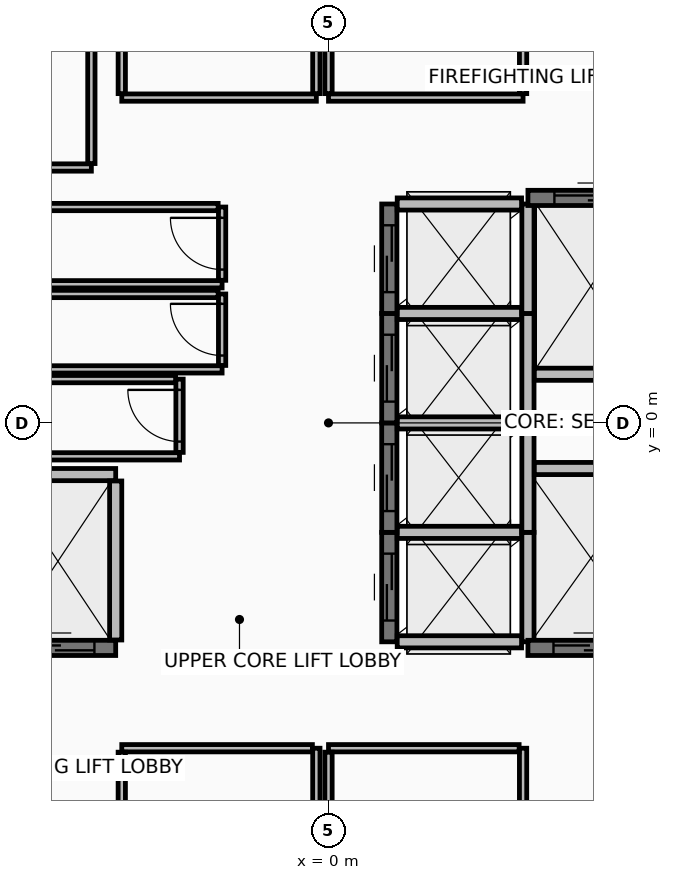
"""IFC4 building model, lengths in metres.
Left out: names, types, materials, properties, quantities, classifications, styles, units other than length and angle.
Written with IfcOpenShell. Run it as: python <this file> out.ifc"""

import sys

from ifc_helpers import new_model, si_unit, direction, frame, frame_2d, origin, place, context, subcontext, project, spatial, rectangle, extrude, element, fill, save


model = new_model("IFC4")
c1 = context("Model", 3, precision=1e-05, world=origin(), true_north=direction((0.0, 1.0)))
c2 = subcontext(c1, "Body", "Model", "MODEL_VIEW")
j1 = project(units=[si_unit("LENGTHUNIT", "METRE"), si_unit("PLANEANGLEUNIT", "RADIAN")], contexts=[c1])
p1 = place(None, origin())
s1 = spatial("IfcSite", under=j1, at=p1, CompositionType="ELEMENT")
p2 = place(p1, origin())
s2 = spatial("IfcBuilding", under=s1, at=p2, CompositionType="ELEMENT")
p3 = place(p2, frame((0.0, 0.0, 241.45)))
s3 = spatial("IfcBuildingStorey", under=s2, at=p3, CompositionType="ELEMENT", Elevation=241.45)
p4 = place(p3, frame((1.0, -3.6, 0.0), z_axis=(0.0, 0.0, 1.0), x_axis=(0.0, 1.0, 0.0)))
e1 = element("IfcWall", 1, at=p4, inside=s3, PredefinedType="SHEAR", context=c2, shape_type="SweptSolid", body=[
    extrude(rectangle(XDim=1.8, YDim=0.25, at=frame_2d((0.9, 0.0))), origin(), (0.0, 0.0, 1.0), 3.42),
])
p5 = place(p4, frame((0.35, 0.0, 0.0)))
e2 = element("IfcOpeningElement", 2, at=p5, cuts=e1, PredefinedType="OPENING", context=c2, shape_type="SweptSolid", body=[
    extrude(rectangle(XDim=1.1, YDim=2.2, at=frame_2d((0.55, 1.1))), frame((0.0, 0.135, 0.0), z_axis=(0.0, -1.0, 0.0), x_axis=(1.0, 0.0, 0.0)), (0.0, 0.0, 1.0), 0.27),
])
p6 = place(p3, frame((3.28, -3.6, 0.0), z_axis=(0.0, 0.0, 1.0), x_axis=(0.0, 1.0, 0.0)))
e3 = element("IfcWall", 3, at=p6, inside=s3, PredefinedType="PARTITIONING", context=c2, shape_type="SweptSolid", body=[
    extrude(rectangle(XDim=1.8, YDim=0.2, at=frame_2d((0.9, 0.0))), origin(), (0.0, 0.0, 1.0), 3.42),
])
for number, where, z_axis, x_axis in (
    (4, (1.13, -3.6, 0.0), (0.0, 0.0, 1.0), (1.0, 0.0, 0.0)),
    (5, (1.13, -1.8, 0.0), (0.0, 0.0, 1.0), (1.0, 0.0, 0.0)),
):
    element("IfcWall", number, at=place(p3, frame(where, z_axis=z_axis, x_axis=x_axis)), inside=s3, PredefinedType="PARTITIONING", context=c2, shape_type="SweptSolid", body=[
        extrude(rectangle(XDim=2.045, YDim=0.2, at=frame_2d((1.022, 0.0))), origin(), (0.0, 0.0, 1.0), 3.42),
    ])
p7 = place(p3, frame((1.0, -1.8, 0.0), z_axis=(0.0, 0.0, 1.0), x_axis=(0.0, 1.0, 0.0)))
e6 = element("IfcWall", 6, at=p7, inside=s3, PredefinedType="SHEAR", context=c2, shape_type="SweptSolid", body=[
    extrude(rectangle(XDim=1.8, YDim=0.25, at=frame_2d((0.9, 0.0))), origin(), (0.0, 0.0, 1.0), 3.42),
])
p8 = place(p7, frame((0.35, 0.0, 0.0)))
e7 = element("IfcOpeningElement", 7, at=p8, cuts=e6, PredefinedType="OPENING", context=c2, shape_type="SweptSolid", body=[
    extrude(rectangle(XDim=1.1, YDim=2.2, at=frame_2d((0.55, 1.1))), frame((0.0, 0.135, 0.0), z_axis=(0.0, -1.0, 0.0), x_axis=(1.0, 0.0, 0.0)), (0.0, 0.0, 1.0), 0.27),
])
p9 = place(p3, frame((3.28, -1.8, 0.0), z_axis=(0.0, 0.0, 1.0), x_axis=(0.0, 1.0, 0.0)))
e8 = element("IfcWall", 8, at=p9, inside=s3, PredefinedType="PARTITIONING", context=c2, shape_type="SweptSolid", body=[
    extrude(rectangle(XDim=1.8, YDim=0.2, at=frame_2d((0.9, 0.0))), origin(), (0.0, 0.0, 1.0), 3.42),
])
p10 = place(p3, frame((1.13, 0.0, 0.0), z_axis=(0.0, 0.0, 1.0), x_axis=(1.0, 0.0, 0.0)))
e9 = element("IfcWall", 9, at=p10, inside=s3, PredefinedType="PARTITIONING", context=c2, shape_type="SweptSolid", body=[
    extrude(rectangle(XDim=2.045, YDim=0.2, at=frame_2d((1.022, 0.0))), origin(), (0.0, 0.0, 1.0), 3.42),
])
p11 = place(p3, frame((1.0, 0.0, 0.0), z_axis=(0.0, 0.0, 1.0), x_axis=(0.0, 1.0, 0.0)))
e10 = element("IfcWall", 10, at=p11, inside=s3, PredefinedType="SHEAR", context=c2, shape_type="SweptSolid", body=[
    extrude(rectangle(XDim=1.8, YDim=0.25, at=frame_2d((0.9, 0.0))), origin(), (0.0, 0.0, 1.0), 3.42),
])
p12 = place(p11, frame((0.35, 0.0, 0.0)))
e11 = element("IfcOpeningElement", 11, at=p12, cuts=e10, PredefinedType="OPENING", context=c2, shape_type="SweptSolid", body=[
    extrude(rectangle(XDim=1.1, YDim=2.2, at=frame_2d((0.55, 1.1))), frame((0.0, 0.135, 0.0), z_axis=(0.0, -1.0, 0.0), x_axis=(1.0, 0.0, 0.0)), (0.0, 0.0, 1.0), 0.27),
])
p13 = place(p3, frame((3.28, 0.0, 0.0), z_axis=(0.0, 0.0, 1.0), x_axis=(0.0, 1.0, 0.0)))
e12 = element("IfcWall", 12, at=p13, inside=s3, PredefinedType="PARTITIONING", context=c2, shape_type="SweptSolid", body=[
    extrude(rectangle(XDim=1.8, YDim=0.2, at=frame_2d((0.9, 0.0))), origin(), (0.0, 0.0, 1.0), 3.42),
])
p14 = place(p3, frame((1.13, 1.8, 0.0), z_axis=(0.0, 0.0, 1.0), x_axis=(1.0, 0.0, 0.0)))
e13 = element("IfcWall", 13, at=p14, inside=s3, PredefinedType="PARTITIONING", context=c2, shape_type="SweptSolid", body=[
    extrude(rectangle(XDim=2.045, YDim=0.2, at=frame_2d((1.022, 0.0))), origin(), (0.0, 0.0, 1.0), 3.42),
])
p15 = place(p3, frame((1.0, 1.8, 0.0), z_axis=(0.0, 0.0, 1.0), x_axis=(0.0, 1.0, 0.0)))
e14 = element("IfcWall", 14, at=p15, inside=s3, PredefinedType="SHEAR", context=c2, shape_type="SweptSolid", body=[
    extrude(rectangle(XDim=1.8, YDim=0.25, at=frame_2d((0.9, 0.0))), origin(), (0.0, 0.0, 1.0), 3.42),
])
p16 = place(p15, frame((0.35, 0.0, 0.0)))
e15 = element("IfcOpeningElement", 15, at=p16, cuts=e14, PredefinedType="OPENING", context=c2, shape_type="SweptSolid", body=[
    extrude(rectangle(XDim=1.1, YDim=2.2, at=frame_2d((0.55, 1.1))), frame((0.0, 0.135, 0.0), z_axis=(0.0, -1.0, 0.0), x_axis=(1.0, 0.0, 0.0)), (0.0, 0.0, 1.0), 0.27),
])
p17 = place(p3, frame((3.28, 1.8, 0.0), z_axis=(0.0, 0.0, 1.0), x_axis=(0.0, 1.0, 0.0)))
e16 = element("IfcWall", 16, at=p17, inside=s3, PredefinedType="PARTITIONING", context=c2, shape_type="SweptSolid", body=[
    extrude(rectangle(XDim=1.8, YDim=0.2, at=frame_2d((0.9, 0.0))), origin(), (0.0, 0.0, 1.0), 3.42),
])
p18 = place(p3, frame((1.13, 3.6, 0.0), z_axis=(0.0, 0.0, 1.0), x_axis=(1.0, 0.0, 0.0)))
e17 = element("IfcWall", 17, at=p18, inside=s3, PredefinedType="PARTITIONING", context=c2, shape_type="SweptSolid", body=[
    extrude(rectangle(XDim=2.045, YDim=0.2, at=frame_2d((1.022, 0.0))), origin(), (0.0, 0.0, 1.0), 2.715),
])
p19 = place(p3, frame((-5.4, -3.7, 0.0), z_axis=(0.0, 0.0, 1.0), x_axis=(1.0, 0.0, 0.0)))
e18 = element("IfcWall", 18, at=p19, inside=s3, PredefinedType="SHEAR", context=c2, shape_type="SweptSolid", body=[
    extrude(rectangle(XDim=1.9, YDim=0.25, at=frame_2d((0.95, 0.0))), origin(), (0.0, 0.0, 1.0), 3.42),
])
p20 = place(p19, frame((0.35, 0.0, 0.0)))
e19 = element("IfcOpeningElement", 19, at=p20, cuts=e18, PredefinedType="OPENING", context=c2, shape_type="SweptSolid", body=[
    extrude(rectangle(XDim=1.2, YDim=2.2, at=frame_2d((0.6, 1.1))), frame((0.0, 0.135, 0.0), z_axis=(0.0, -1.0, 0.0), x_axis=(1.0, 0.0, 0.0)), (0.0, 0.0, 1.0), 0.27),
])
p21 = place(p3, frame((-5.27, -0.85, 0.0), z_axis=(0.0, 0.0, 1.0), x_axis=(1.0, 0.0, 0.0)))
e20 = element("IfcWall", 20, at=p21, inside=s3, PredefinedType="PARTITIONING", context=c2, shape_type="SweptSolid", body=[
    extrude(rectangle(XDim=1.77, YDim=0.2, at=frame_2d((0.885, 0.0))), origin(), (0.0, 0.0, 1.0), 3.42),
])
p22 = place(p3, frame((-3.5, -3.57, 0.0), z_axis=(0.0, 0.0, 1.0), x_axis=(0.0, 1.0, 0.0)))
e21 = element("IfcWall", 21, at=p22, inside=s3, PredefinedType="PARTITIONING", context=c2, shape_type="SweptSolid", body=[
    extrude(rectangle(XDim=2.615, YDim=0.2, at=frame_2d((1.308, 0.0))), origin(), (0.0, 0.0, 1.0), 3.42),
])
p23 = place(p3, frame((3.28, 3.7, 0.0), z_axis=(0.0, 0.0, 1.0), x_axis=(1.0, 0.0, 0.0)))
e22 = element("IfcWall", 22, at=p23, inside=s3, PredefinedType="SHEAR", context=c2, shape_type="SweptSolid", body=[
    extrude(rectangle(XDim=2.07, YDim=0.25, at=frame_2d((1.035, 0.0))), origin(), (0.0, 0.0, 1.0), 3.42),
])
p24 = place(p23, frame((0.435, 0.0, 0.0)))
e23 = element("IfcOpeningElement", 23, at=p24, cuts=e22, PredefinedType="OPENING", context=c2, shape_type="SweptSolid", body=[
    extrude(rectangle(XDim=1.2, YDim=2.2, at=frame_2d((0.6, 1.1))), frame((0.0, 0.135, 0.0), z_axis=(0.0, -1.0, 0.0), x_axis=(1.0, 0.0, 0.0)), (0.0, 0.0, 1.0), 0.27),
])
p25 = place(p3, frame((3.385, 0.8, 0.0), z_axis=(0.0, 0.0, 1.0), x_axis=(1.0, 0.0, 0.0)))
e24 = element("IfcWall", 24, at=p25, inside=s3, PredefinedType="PARTITIONING", context=c2, shape_type="SweptSolid", body=[
    extrude(rectangle(XDim=1.835, YDim=0.2, at=frame_2d((0.917, 0.0))), origin(), (0.0, 0.0, 1.0), 3.42),
])
p26 = place(p3, frame((3.28, -3.7, 0.0), z_axis=(0.0, 0.0, 1.0), x_axis=(1.0, 0.0, 0.0)))
e25 = element("IfcWall", 25, at=p26, inside=s3, PredefinedType="SHEAR", context=c2, shape_type="SweptSolid", body=[
    extrude(rectangle(XDim=1.94, YDim=0.25, at=frame_2d((0.97, 0.0))), origin(), (0.0, 0.0, 1.0), 3.42),
])
p27 = place(p26, frame((0.42, 0.0, 0.0)))
e26 = element("IfcOpeningElement", 26, at=p27, cuts=e25, PredefinedType="OPENING", context=c2, shape_type="SweptSolid", body=[
    extrude(rectangle(XDim=1.1, YDim=2.2, at=frame_2d((0.55, 1.1))), frame((0.0, 0.135, 0.0), z_axis=(0.0, -1.0, 0.0), x_axis=(1.0, 0.0, 0.0)), (0.0, 0.0, 1.0), 0.27),
])
p28 = place(p3, frame((3.385, -0.75, 0.0), z_axis=(0.0, 0.0, 1.0), x_axis=(1.0, 0.0, 0.0)))
e27 = element("IfcWall", 27, at=p28, inside=s3, PredefinedType="PARTITIONING", context=c2, shape_type="SweptSolid", body=[
    extrude(rectangle(XDim=1.835, YDim=0.2, at=frame_2d((0.917, 0.0))), origin(), (0.0, 0.0, 1.0), 3.42),
])
p29 = place(p3, frame((-5.22, 2.28, 0.0), z_axis=(0.0, 0.0, 1.0), x_axis=(1.0, 0.0, 0.0)))
e28 = element("IfcWall", 28, at=p29, inside=s3, PredefinedType="PARTITIONING", context=c2, shape_type="SweptSolid", body=[
    extrude(rectangle(XDim=3.47, YDim=0.12, at=frame_2d((1.735, 0.0))), origin(), (0.0, 0.0, 1.0), 3.42),
])
p30 = place(p3, frame((-1.75, 2.345, 0.0), z_axis=(0.0, 0.0, 1.0), x_axis=(0.0, 1.0, 0.0)))
e29 = element("IfcWall", 29, at=p30, inside=s3, PredefinedType="PARTITIONING", context=c2, shape_type="SweptSolid", body=[
    extrude(rectangle(XDim=1.205, YDim=0.12, at=frame_2d((0.603, 0.0))), origin(), (0.0, 0.0, 1.0), 3.42),
])
p31 = place(p30, frame((0.177, 0.0, 0.0)))
e30 = element("IfcOpeningElement", 30, at=p31, cuts=e29, PredefinedType="OPENING", context=c2, shape_type="SweptSolid", body=[
    extrude(rectangle(XDim=0.85, YDim=2.1, at=frame_2d((0.425, 1.05))), frame((0.0, 0.07, 0.0), z_axis=(0.0, -1.0, 0.0), x_axis=(1.0, 0.0, 0.0)), (0.0, 0.0, 1.0), 0.14),
])
p32 = place(p3, frame((-1.815, 3.55, 0.0), z_axis=(0.0, 0.0, 1.0), x_axis=(-1.0, 0.0, 0.0)))
e31 = element("IfcWall", 31, at=p32, inside=s3, PredefinedType="PARTITIONING", context=c2, shape_type="SweptSolid", body=[
    extrude(rectangle(XDim=3.405, YDim=0.12, at=frame_2d((1.703, 0.0))), origin(), (0.0, 0.0, 1.0), 3.42),
])
p33 = place(p3, frame((-5.22, 0.88, 0.0), z_axis=(0.0, 0.0, 1.0), x_axis=(1.0, 0.0, 0.0)))
e32 = element("IfcWall", 32, at=p33, inside=s3, PredefinedType="PARTITIONING", context=c2, shape_type="SweptSolid", body=[
    extrude(rectangle(XDim=3.47, YDim=0.12, at=frame_2d((1.735, 0.0))), origin(), (0.0, 0.0, 1.0), 3.42),
])
p34 = place(p3, frame((-1.75, 0.945, 0.0), z_axis=(0.0, 0.0, 1.0), x_axis=(0.0, 1.0, 0.0)))
e33 = element("IfcWall", 33, at=p34, inside=s3, PredefinedType="PARTITIONING", context=c2, shape_type="SweptSolid", body=[
    extrude(rectangle(XDim=1.175, YDim=0.12, at=frame_2d((0.587, 0.0))), origin(), (0.0, 0.0, 1.0), 3.42),
])
p35 = place(p34, frame((0.163, 0.0, 0.0)))
e34 = element("IfcOpeningElement", 34, at=p35, cuts=e33, PredefinedType="OPENING", context=c2, shape_type="SweptSolid", body=[
    extrude(rectangle(XDim=0.85, YDim=2.1, at=frame_2d((0.425, 1.05))), frame((0.0, 0.07, 0.0), z_axis=(0.0, -1.0, 0.0), x_axis=(1.0, 0.0, 0.0)), (0.0, 0.0, 1.0), 0.14),
])
p36 = place(p3, frame((-1.815, 2.12, 0.0), z_axis=(0.0, 0.0, 1.0), x_axis=(-1.0, 0.0, 0.0)))
e35 = element("IfcWall", 35, at=p36, inside=s3, PredefinedType="PARTITIONING", context=c2, shape_type="SweptSolid", body=[
    extrude(rectangle(XDim=3.405, YDim=0.12, at=frame_2d((1.703, 0.0))), origin(), (0.0, 0.0, 1.0), 3.42),
])
p37 = place(p3, frame((-5.22, -0.55, 0.0), z_axis=(0.0, 0.0, 1.0), x_axis=(1.0, 0.0, 0.0)))
e36 = element("IfcWall", 36, at=p37, inside=s3, PredefinedType="PARTITIONING", context=c2, shape_type="SweptSolid", body=[
    extrude(rectangle(XDim=2.77, YDim=0.12, at=frame_2d((1.385, 0.0))), origin(), (0.0, 0.0, 1.0), 3.42),
])
p38 = place(p3, frame((-2.45, -0.485, 0.0), z_axis=(0.0, 0.0, 1.0), x_axis=(0.0, 1.0, 0.0)))
e37 = element("IfcWall", 37, at=p38, inside=s3, PredefinedType="PARTITIONING", context=c2, shape_type="SweptSolid", body=[
    extrude(rectangle(XDim=1.205, YDim=0.12, at=frame_2d((0.603, 0.0))), origin(), (0.0, 0.0, 1.0), 3.42),
])
p39 = place(p38, frame((0.178, 0.0, 0.0)))
e38 = element("IfcOpeningElement", 38, at=p39, cuts=e37, PredefinedType="OPENING", context=c2, shape_type="SweptSolid", body=[
    extrude(rectangle(XDim=0.85, YDim=2.1, at=frame_2d((0.425, 1.05))), frame((0.0, 0.07, 0.0), z_axis=(0.0, -1.0, 0.0), x_axis=(1.0, 0.0, 0.0)), (0.0, 0.0, 1.0), 0.14),
])
p40 = place(p3, frame((-2.515, 0.72, 0.0), z_axis=(0.0, 0.0, 1.0), x_axis=(-1.0, 0.0, 0.0)))
e39 = element("IfcWall", 39, at=p40, inside=s3, PredefinedType="PARTITIONING", context=c2, shape_type="SweptSolid", body=[
    extrude(rectangle(XDim=2.705, YDim=0.12, at=frame_2d((1.353, 0.0))), origin(), (0.0, 0.0, 1.0), 3.42),
])
p41 = place(p3, frame((-0.2, -7.42, 0.0), z_axis=(0.0, 0.0, 1.0), x_axis=(0.0, 1.0, 0.0)))
e40 = element("IfcWall", 40, at=p41, inside=s3, PredefinedType="PARTITIONING", context=c2, shape_type="SweptSolid", body=[
    extrude(rectangle(XDim=2.07, YDim=0.12, at=frame_2d((1.035, 0.0))), origin(), (0.0, 0.0, 1.0), 2.715),
])
p42 = place(p3, frame((-0.265, -5.35, 0.0), z_axis=(0.0, 0.0, 1.0), x_axis=(-1.0, 0.0, 0.0)))
e41 = element("IfcWall", 41, at=p42, inside=s3, PredefinedType="PARTITIONING", context=c2, shape_type="SweptSolid", body=[
    extrude(rectangle(XDim=3.135, YDim=0.12, at=frame_2d((1.567, 0.0))), origin(), (0.0, 0.0, 1.0), 2.715),
])
p43 = place(p3, frame((-3.4, -5.415, 0.0), z_axis=(0.0, 0.0, 1.0), x_axis=(0.0, -1.0, 0.0)))
e42 = element("IfcWall", 42, at=p43, inside=s3, PredefinedType="PARTITIONING", context=c2, shape_type="SweptSolid", body=[
    extrude(rectangle(XDim=2.8, YDim=0.12, at=frame_2d((1.4, 0.0))), origin(), (0.0, 0.0, 1.0), 2.715),
])
p44 = place(p3, frame((3.2, -8.215, 0.0), z_axis=(0.0, 0.0, 1.0), x_axis=(0.0, 1.0, 0.0)))
e43 = element("IfcWall", 43, at=p44, inside=s3, PredefinedType="PARTITIONING", context=c2, shape_type="SweptSolid", body=[
    extrude(rectangle(XDim=2.865, YDim=0.12, at=frame_2d((1.433, 0.0))), origin(), (0.0, 0.0, 1.0), 2.715),
])
p45 = place(p3, frame((3.135, -5.35, 0.0), z_axis=(0.0, 0.0, 1.0), x_axis=(-1.0, 0.0, 0.0)))
e44 = element("IfcWall", 44, at=p45, inside=s3, PredefinedType="PARTITIONING", context=c2, shape_type="SweptSolid", body=[
    extrude(rectangle(XDim=3.135, YDim=0.12, at=frame_2d((1.567, 0.0))), origin(), (0.0, 0.0, 1.0), 3.42),
])
p46 = place(p3, frame((0.0, -5.415, 0.0), z_axis=(0.0, 0.0, 1.0), x_axis=(0.0, -1.0, 0.0)))
e45 = element("IfcWall", 45, at=p46, inside=s3, PredefinedType="PARTITIONING", context=c2, shape_type="SweptSolid", body=[
    extrude(rectangle(XDim=2.005, YDim=0.12, at=frame_2d((1.002, 0.0))), origin(), (0.0, 0.0, 1.0), 2.715),
])
p47 = place(p3, frame((-3.4, 5.35, 0.0), z_axis=(0.0, 0.0, 1.0), x_axis=(1.0, 0.0, 0.0)))
e46 = element("IfcWall", 46, at=p47, inside=s3, PredefinedType="PARTITIONING", context=c2, shape_type="SweptSolid", body=[
    extrude(rectangle(XDim=3.2, YDim=0.12, at=frame_2d((1.6, 0.0))), origin(), (0.0, 0.0, 1.0), 3.42),
])
p48 = place(p3, frame((-0.2, 5.415, 0.0), z_axis=(0.0, 0.0, 1.0), x_axis=(0.0, 1.0, 0.0)))
e47 = element("IfcWall", 47, at=p48, inside=s3, PredefinedType="PARTITIONING", context=c2, shape_type="SweptSolid", body=[
    extrude(rectangle(XDim=2.005, YDim=0.12, at=frame_2d((1.002, 0.0))), origin(), (0.0, 0.0, 1.0), 2.715),
])
p49 = place(p3, frame((-3.4, 8.215, 0.0), z_axis=(0.0, 0.0, 1.0), x_axis=(0.0, -1.0, 0.0)))
e48 = element("IfcWall", 48, at=p49, inside=s3, PredefinedType="PARTITIONING", context=c2, shape_type="SweptSolid", body=[
    extrude(rectangle(XDim=2.8, YDim=0.12, at=frame_2d((1.4, 0.0))), origin(), (0.0, 0.0, 1.0), 2.715),
])
p50 = place(p3, frame((0.0, 5.35, 0.0), z_axis=(0.0, 0.0, 1.0), x_axis=(1.0, 0.0, 0.0)))
e49 = element("IfcWall", 49, at=p50, inside=s3, PredefinedType="PARTITIONING", context=c2, shape_type="SweptSolid", body=[
    extrude(rectangle(XDim=3.2, YDim=0.12, at=frame_2d((1.6, 0.0))), origin(), (0.0, 0.0, 1.0), 2.715),
])
p51 = place(p3, frame((3.2, 5.415, 0.0), z_axis=(0.0, 0.0, 1.0), x_axis=(0.0, 1.0, 0.0)))
e50 = element("IfcWall", 50, at=p51, inside=s3, PredefinedType="PARTITIONING", context=c2, shape_type="SweptSolid", body=[
    extrude(rectangle(XDim=2.8, YDim=0.12, at=frame_2d((1.4, 0.0))), origin(), (0.0, 0.0, 1.0), 2.715),
])
p52 = place(p3, frame((0.0, 7.42, 0.0), z_axis=(0.0, 0.0, 1.0), x_axis=(0.0, -1.0, 0.0)))
e51 = element("IfcWall", 51, at=p52, inside=s3, PredefinedType="PARTITIONING", context=c2, shape_type="SweptSolid", body=[
    extrude(rectangle(XDim=2.005, YDim=0.12, at=frame_2d((1.002, 0.0))), origin(), (0.0, 0.0, 1.0), 2.715),
])
p53 = place(p3, frame((-7.8, 4.2, 0.0), z_axis=(0.0, 0.0, 1.0), x_axis=(1.0, 0.0, 0.0)))
e52 = element("IfcWall", 52, at=p53, inside=s3, PredefinedType="PARTITIONING", context=c2, shape_type="SweptSolid", body=[
    extrude(rectangle(XDim=3.9, YDim=0.12, at=frame_2d((1.95, 0.0))), origin(), (0.0, 0.0, 1.0), 3.42),
])
p54 = place(p3, frame((-3.9, 4.265, 0.0), z_axis=(0.0, 0.0, 1.0), x_axis=(0.0, 1.0, 0.0)))
e53 = element("IfcWall", 53, at=p54, inside=s3, PredefinedType="PARTITIONING", context=c2, shape_type="SweptSolid", body=[
    extrude(rectangle(XDim=3.95, YDim=0.12, at=frame_2d((1.975, 0.0))), origin(), (0.0, 0.0, 1.0), 2.715),
])
p55 = place(p5, origin())
e54 = element("IfcDoor", 54, at=p55, inside=s3, OperationType="SLIDING_TO_LEFT", PredefinedType="DOOR", context=c2, shape_type="SweptSolid", body=[
    extrude(rectangle(XDim=1.1, YDim=2.2, at=frame_2d((0.55, 1.1))), frame((0.0, 0.025, 0.0), z_axis=(0.0, -1.0, 0.0), x_axis=(1.0, 0.0, 0.0)), (0.0, 0.0, 1.0), 0.05),
])
fill(e2, e54)
p56 = place(p8, origin())
e55 = element("IfcDoor", 55, at=p56, inside=s3, OperationType="SLIDING_TO_LEFT", PredefinedType="DOOR", context=c2, shape_type="SweptSolid", body=[
    extrude(rectangle(XDim=1.1, YDim=2.2, at=frame_2d((0.55, 1.1))), frame((0.0, 0.025, 0.0), z_axis=(0.0, -1.0, 0.0), x_axis=(1.0, 0.0, 0.0)), (0.0, 0.0, 1.0), 0.05),
])
fill(e7, e55)
p57 = place(p12, origin())
e56 = element("IfcDoor", 56, at=p57, inside=s3, OperationType="SLIDING_TO_LEFT", PredefinedType="DOOR", context=c2, shape_type="SweptSolid", body=[
    extrude(rectangle(XDim=1.1, YDim=2.2, at=frame_2d((0.55, 1.1))), frame((0.0, 0.025, 0.0), z_axis=(0.0, -1.0, 0.0), x_axis=(1.0, 0.0, 0.0)), (0.0, 0.0, 1.0), 0.05),
])
fill(e11, e56)
p58 = place(p16, origin())
e57 = element("IfcDoor", 57, at=p58, inside=s3, OperationType="SLIDING_TO_LEFT", PredefinedType="DOOR", context=c2, shape_type="SweptSolid", body=[
    extrude(rectangle(XDim=1.1, YDim=2.2, at=frame_2d((0.55, 1.1))), frame((0.0, 0.025, 0.0), z_axis=(0.0, -1.0, 0.0), x_axis=(1.0, 0.0, 0.0)), (0.0, 0.0, 1.0), 0.05),
])
fill(e15, e57)
p59 = place(p20, origin())
e58 = element("IfcDoor", 58, at=p59, inside=s3, OperationType="SLIDING_TO_RIGHT", PredefinedType="DOOR", context=c2, shape_type="SweptSolid", body=[
    extrude(rectangle(XDim=1.2, YDim=2.2, at=frame_2d((0.6, 1.1))), frame((0.0, 0.025, 0.0), z_axis=(0.0, -1.0, 0.0), x_axis=(1.0, 0.0, 0.0)), (0.0, 0.0, 1.0), 0.05),
])
fill(e19, e58)
p60 = place(p24, origin())
e59 = element("IfcDoor", 59, at=p60, inside=s3, OperationType="SLIDING_TO_RIGHT", PredefinedType="DOOR", context=c2, shape_type="SweptSolid", body=[
    extrude(rectangle(XDim=1.2, YDim=2.2, at=frame_2d((0.6, 1.1))), frame((0.0, 0.025, 0.0), z_axis=(0.0, -1.0, 0.0), x_axis=(1.0, 0.0, 0.0)), (0.0, 0.0, 1.0), 0.05),
])
fill(e23, e59)
p61 = place(p27, origin())
e60 = element("IfcDoor", 60, at=p61, inside=s3, OperationType="SLIDING_TO_LEFT", PredefinedType="DOOR", context=c2, shape_type="SweptSolid", body=[
    extrude(rectangle(XDim=1.1, YDim=2.2, at=frame_2d((0.55, 1.1))), frame((0.0, 0.025, 0.0), z_axis=(0.0, -1.0, 0.0), x_axis=(1.0, 0.0, 0.0)), (0.0, 0.0, 1.0), 0.05),
])
fill(e26, e60)
p62 = place(p31, frame((0.85, 0.0, 0.0), z_axis=(0.0, 0.0, 1.0), x_axis=(-1.0, 0.0, 0.0)))
e61 = element("IfcDoor", 61, at=p62, inside=s3, OperationType="SINGLE_SWING_RIGHT", PredefinedType="DOOR", context=c2, shape_type="SweptSolid", body=[
    extrude(rectangle(XDim=0.85, YDim=2.1, at=frame_2d((0.425, 1.05))), frame((0.0, 0.025, 0.0), z_axis=(0.0, -1.0, 0.0), x_axis=(1.0, 0.0, 0.0)), (0.0, 0.0, 1.0), 0.05),
])
fill(e30, e61)
p63 = place(p35, frame((0.85, 0.0, 0.0), z_axis=(0.0, 0.0, 1.0), x_axis=(-1.0, 0.0, 0.0)))
e62 = element("IfcDoor", 62, at=p63, inside=s3, OperationType="SINGLE_SWING_RIGHT", PredefinedType="DOOR", context=c2, shape_type="SweptSolid", body=[
    extrude(rectangle(XDim=0.85, YDim=2.1, at=frame_2d((0.425, 1.05))), frame((0.0, 0.025, 0.0), z_axis=(0.0, -1.0, 0.0), x_axis=(1.0, 0.0, 0.0)), (0.0, 0.0, 1.0), 0.05),
])
fill(e34, e62)
p64 = place(p39, frame((0.85, 0.0, 0.0), z_axis=(0.0, 0.0, 1.0), x_axis=(-1.0, 0.0, 0.0)))
e63 = element("IfcDoor", 63, at=p64, inside=s3, OperationType="SINGLE_SWING_RIGHT", PredefinedType="DOOR", context=c2, shape_type="SweptSolid", body=[
    extrude(rectangle(XDim=0.85, YDim=2.1, at=frame_2d((0.425, 1.05))), frame((0.0, 0.025, 0.0), z_axis=(0.0, -1.0, 0.0), x_axis=(1.0, 0.0, 0.0)), (0.0, 0.0, 1.0), 0.05),
])
fill(e38, e63)
save(model, sys.argv[1])
